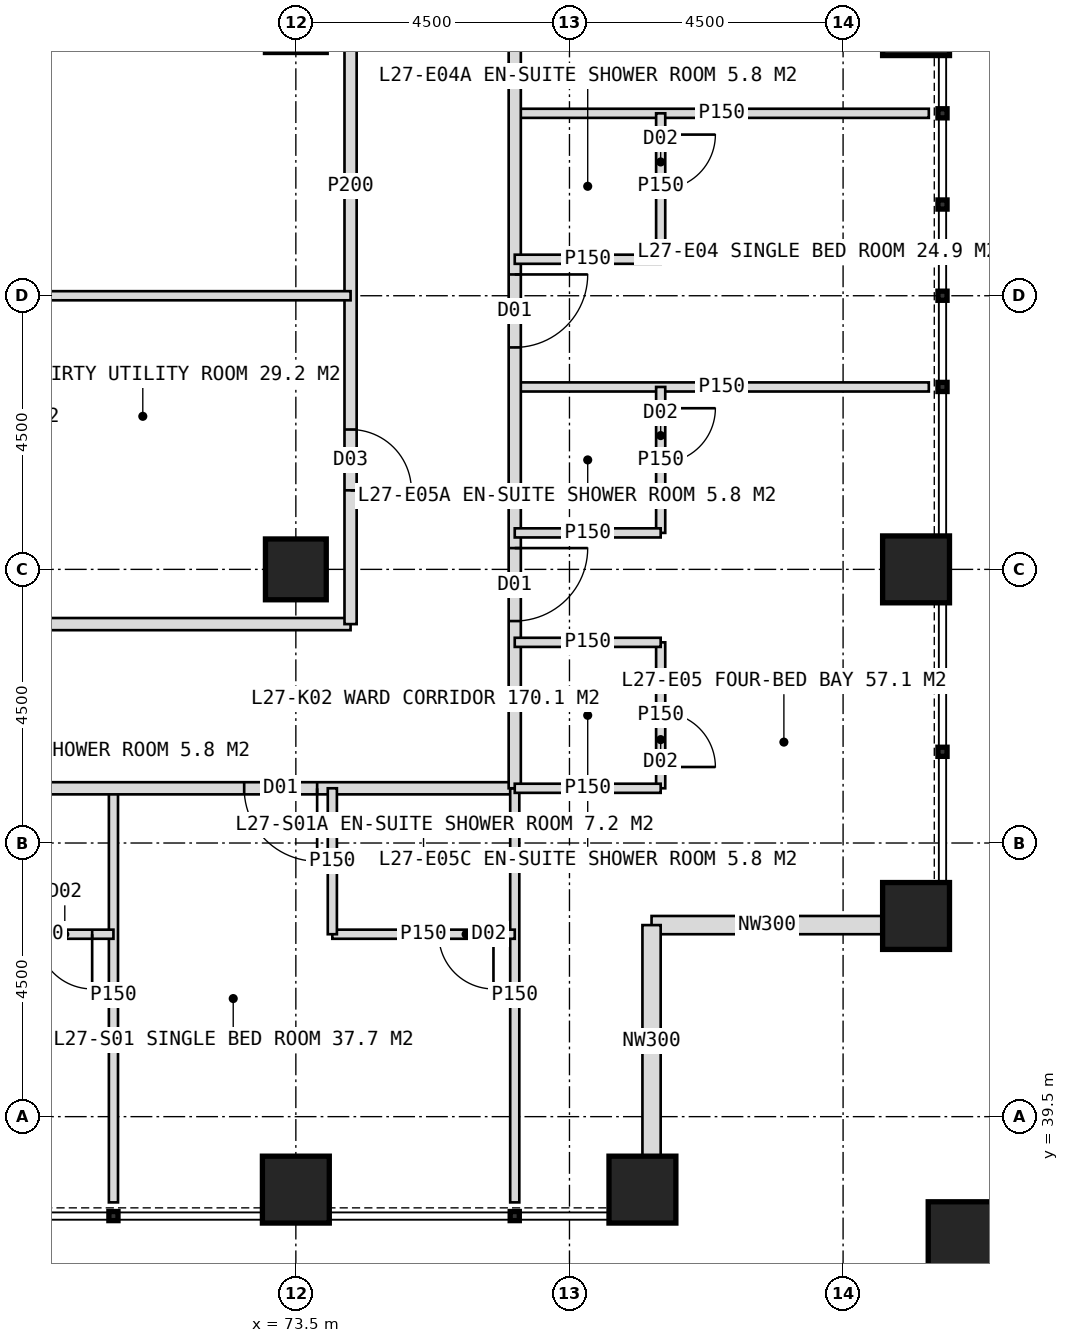
"""IFC4 building model, lengths in metres.
Left out: names, types, materials, properties, quantities, classifications, styles, units other than length and angle.
Written with IfcOpenShell. Run it as: python <this file> out.ifc"""

import sys

from ifc_helpers import new_model, si_unit, direction, frame, frame_2d, origin, origin_2d, place, context, subcontext, project, spatial, rectangle, hollow_rectangle, extrude, element, fill, save


model = new_model("IFC4")
c1 = context("Model", 3, precision=1e-05, world=origin(), true_north=direction((0.0, 1.0)))
c2 = subcontext(c1, "Body", "Model", "MODEL_VIEW")
j1 = project(units=[si_unit("LENGTHUNIT", "METRE"), si_unit("PLANEANGLEUNIT", "RADIAN")], contexts=[c1])
p1 = place(None, origin())
s1 = spatial("IfcSite", under=j1, at=p1, CompositionType="ELEMENT")
p2 = place(p1, origin())
s2 = spatial("IfcBuilding", under=s1, at=p2, CompositionType="ELEMENT")
p3 = place(p2, frame((0.0, 0.0, 116.0)))
s3 = spatial("IfcBuildingStorey", under=s2, at=p3, CompositionType="ELEMENT", Elevation=116.0)
p4 = place(p3, frame((73.5, 48.5, 0.0), z_axis=(0.0, 0.0, 1.0), x_axis=(1.0, 0.0, 0.0)))
e1 = element("IfcColumn", 1, at=p4, inside=s3, PredefinedType="COLUMN", context=c2, shape_type="SweptSolid", body=[
    extrude(hollow_rectangle(XDim=1.0, YDim=1.0, WallThickness=0.1, at=origin_2d()), origin(), (0.0, 0.0, 1.0), 4.0),
])
for number, where, z_axis, x_axis in (
    (2, (83.7, 42.8, 0.0), (0.0, 0.0, 1.0), (1.0, 0.0, 0.0)),
    (3, (83.7, 48.5, 0.0), (0.0, 0.0, 1.0), (1.0, 0.0, 0.0)),
    (4, (83.7, 57.5, 0.0), (0.0, 0.0, 1.0), (1.0, 0.0, 0.0)),
    (5, (73.5, 38.3, 0.0), (0.0, 0.0, 1.0), (1.0, 0.0, 0.0)),
    (6, (79.2, 38.3, 0.0), (0.0, 0.0, 1.0), (1.0, 0.0, 0.0)),
):
    element("IfcColumn", number, at=place(p3, frame(where, z_axis=z_axis, x_axis=x_axis)), inside=s3, PredefinedType="COLUMN", context=c2, shape_type="SweptSolid", body=[
        extrude(hollow_rectangle(XDim=1.1, YDim=1.1, WallThickness=0.1, at=origin_2d()), origin(), (0.0, 0.0, 1.0), 4.0),
    ])
p5 = place(p3, frame((84.6, 37.4, 0.0), z_axis=(0.0, 0.0, 1.0), x_axis=(1.0, 0.0, 0.0)))
e7 = element("IfcColumn", 7, at=p5, inside=s3, PredefinedType="COLUMN", context=c2, shape_type="SweptSolid", body=[
    extrude(hollow_rectangle(XDim=1.4, YDim=1.4, WallThickness=0.08, at=origin_2d()), origin(), (0.0, 0.0, 1.0), 4.0),
])
for number, where, z_axis, x_axis in (
    (8, (83.15, 42.65, 0.0), (0.0, 0.0, 1.0), (-1.0, 0.0, 0.0)),
    (9, (79.35, 42.65, 0.0), (0.0, 0.0, 1.0), (0.0, -1.0, 0.0)),
):
    element("IfcWall", number, at=place(p3, frame(where, z_axis=z_axis, x_axis=x_axis)), inside=s3, PredefinedType="ELEMENTEDWALL", context=c2, shape_type="SweptSolid", body=[
        extrude(rectangle(XDim=3.8, YDim=0.3, at=frame_2d((1.9, 0.0))), origin(), (0.0, 0.0, 1.0), 4.0),
    ])
p6 = place(p3, frame((70.5, 44.9, 0.0), z_axis=(0.0, 0.0, 1.0), x_axis=(0.0, -1.0, 0.0)))
e10 = element("IfcWall", 10, at=p6, inside=s3, PredefinedType="PARTITIONING", context=c2, shape_type="SweptSolid", body=[
    extrude(rectangle(XDim=6.81, YDim=0.15, at=frame_2d((3.405, 0.0))), origin(), (0.0, 0.0, 1.0), 3.75),
])
p7 = place(p3, frame((77.1, 44.9, 0.0), z_axis=(0.0, 0.0, 1.0), x_axis=(-1.0, 0.0, 0.0)))
e11 = element("IfcWall", 11, at=p7, inside=s3, PredefinedType="PARTITIONING", context=c2, shape_type="SweptSolid", body=[
    extrude(rectangle(XDim=34.2, YDim=0.2, at=frame_2d((17.1, 0.0))), origin(), (0.0, 0.0, 1.0), 3.75),
])
p8 = place(p7, frame((3.25, 0.0, 0.0)))
e12 = element("IfcOpeningElement", 12, at=p8, cuts=e11, PredefinedType="OPENING", context=c2, shape_type="SweptSolid", body=[
    extrude(rectangle(XDim=1.2, YDim=2.2, at=frame_2d((0.6, 1.1))), frame((0.0, 0.11, 0.0), z_axis=(0.0, -1.0, 0.0), x_axis=(1.0, 0.0, 0.0)), (0.0, 0.0, 1.0), 0.22),
])
p9 = place(p7, frame((9.25, 0.0, 0.0)))
e13 = element("IfcOpeningElement", 13, at=p9, cuts=e11, PredefinedType="OPENING", context=c2, shape_type="SweptSolid", body=[
    extrude(rectangle(XDim=1.2, YDim=2.2, at=frame_2d((0.6, 1.1))), frame((0.0, 0.11, 0.0), z_axis=(0.0, -1.0, 0.0), x_axis=(1.0, 0.0, 0.0)), (0.0, 0.0, 1.0), 0.22),
])
p10 = place(p7, frame((18.25, 0.0, 0.0)))
e14 = element("IfcOpeningElement", 14, at=p10, cuts=e11, PredefinedType="OPENING", context=c2, shape_type="SweptSolid", body=[
    extrude(rectangle(XDim=1.2, YDim=2.2, at=frame_2d((0.6, 1.1))), frame((0.0, 0.11, 0.0), z_axis=(0.0, -1.0, 0.0), x_axis=(1.0, 0.0, 0.0)), (0.0, 0.0, 1.0), 0.22),
])
p11 = place(p7, frame((27.25, 0.0, 0.0)))
e15 = element("IfcOpeningElement", 15, at=p11, cuts=e11, PredefinedType="OPENING", context=c2, shape_type="SweptSolid", body=[
    extrude(rectangle(XDim=1.2, YDim=2.2, at=frame_2d((0.6, 1.1))), frame((0.0, 0.11, 0.0), z_axis=(0.0, -1.0, 0.0), x_axis=(1.0, 0.0, 0.0)), (0.0, 0.0, 1.0), 0.22),
])
p12 = place(p3, frame((77.1, 44.9, 0.0), z_axis=(0.0, 0.0, 1.0), x_axis=(0.0, -1.0, 0.0)))
e16 = element("IfcWall", 16, at=p12, inside=s3, PredefinedType="PARTITIONING", context=c2, shape_type="SweptSolid", body=[
    extrude(rectangle(XDim=6.81, YDim=0.15, at=frame_2d((3.405, 0.0))), origin(), (0.0, 0.0, 1.0), 3.75),
])
p13 = place(p3, frame((77.1, 42.5, 0.0), z_axis=(0.0, 0.0, 1.0), x_axis=(-1.0, 0.0, 0.0)))
e17 = element("IfcWall", 17, at=p13, inside=s3, PredefinedType="PARTITIONING", context=c2, shape_type="SweptSolid", body=[
    extrude(rectangle(XDim=3.0, YDim=0.15, at=frame_2d((1.5, 0.0))), origin(), (0.0, 0.0, 1.0), 3.75),
])
p14 = place(p13, frame((0.35, 0.0, 0.0)))
e18 = element("IfcOpeningElement", 18, at=p14, cuts=e17, PredefinedType="OPENING", context=c2, shape_type="SweptSolid", body=[
    extrude(rectangle(XDim=0.9, YDim=2.1, at=frame_2d((0.45, 1.05))), frame((0.0, 0.085, 0.0), z_axis=(0.0, -1.0, 0.0), x_axis=(1.0, 0.0, 0.0)), (0.0, 0.0, 1.0), 0.17),
])
p15 = place(p3, frame((74.1, 44.9, 0.0), z_axis=(0.0, 0.0, 1.0), x_axis=(0.0, -1.0, 0.0)))
e19 = element("IfcWall", 19, at=p15, inside=s3, PredefinedType="PARTITIONING", context=c2, shape_type="SweptSolid", body=[
    extrude(rectangle(XDim=2.4, YDim=0.15, at=frame_2d((1.2, 0.0))), origin(), (0.0, 0.0, 1.0), 3.75),
])
p16 = place(p3, frame((70.5, 42.5, 0.0), z_axis=(0.0, 0.0, 1.0), x_axis=(-1.0, 0.0, 0.0)))
e20 = element("IfcWall", 20, at=p16, inside=s3, PredefinedType="PARTITIONING", context=c2, shape_type="SweptSolid", body=[
    extrude(rectangle(XDim=2.4, YDim=0.15, at=frame_2d((1.2, 0.0))), origin(), (0.0, 0.0, 1.0), 3.75),
])
p17 = place(p16, frame((0.35, 0.0, 0.0)))
e21 = element("IfcOpeningElement", 21, at=p17, cuts=e20, PredefinedType="OPENING", context=c2, shape_type="SweptSolid", body=[
    extrude(rectangle(XDim=0.9, YDim=2.1, at=frame_2d((0.45, 1.05))), frame((0.0, 0.085, 0.0), z_axis=(0.0, -1.0, 0.0), x_axis=(1.0, 0.0, 0.0)), (0.0, 0.0, 1.0), 0.17),
])
p18 = place(p3, frame((74.4, 47.6, 0.0), z_axis=(0.0, 0.0, 1.0), x_axis=(-1.0, 0.0, 0.0)))
e22 = element("IfcWall", 22, at=p18, inside=s3, PredefinedType="PARTITIONING", context=c2, shape_type="SweptSolid", body=[
    extrude(rectangle(XDim=12.15, YDim=0.2, at=frame_2d((6.075, 0.0))), origin(), (0.0, 0.0, 1.0), 3.75),
])
p19 = place(p18, frame((6.85, 0.0, 0.0)))
e23 = element("IfcOpeningElement", 23, at=p19, cuts=e22, PredefinedType="OPENING", context=c2, shape_type="SweptSolid", body=[
    extrude(rectangle(XDim=1.0, YDim=2.1, at=frame_2d((0.5, 1.05))), frame((0.0, 0.11, 0.0), z_axis=(0.0, -1.0, 0.0), x_axis=(1.0, 0.0, 0.0)), (0.0, 0.0, 1.0), 0.22),
])
for number, where, z_axis, x_axis in (
    (24, (77.1, 56.0, 0.0), (0.0, 0.0, 1.0), (1.0, 0.0, 0.0)),
    (25, (77.1, 51.5, 0.0), (0.0, 0.0, 1.0), (1.0, 0.0, 0.0)),
):
    element("IfcWall", number, at=place(p3, frame(where, z_axis=z_axis, x_axis=x_axis)), inside=s3, PredefinedType="PARTITIONING", context=c2, shape_type="SweptSolid", body=[
        extrude(rectangle(XDim=6.81, YDim=0.15, at=frame_2d((3.405, 0.0))), origin(), (0.0, 0.0, 1.0), 3.75),
    ])
p20 = place(p3, frame((77.1, 79.1, 0.0), z_axis=(0.0, 0.0, 1.0), x_axis=(0.0, -1.0, 0.0)))
e26 = element("IfcWall", 26, at=p20, inside=s3, PredefinedType="PARTITIONING", context=c2, shape_type="SweptSolid", body=[
    extrude(rectangle(XDim=34.2, YDim=0.2, at=frame_2d((17.1, 0.0))), origin(), (0.0, 0.0, 1.0), 3.75),
])
p21 = place(p20, frame((2.65, 0.0, 0.0)))
e27 = element("IfcOpeningElement", 27, at=p21, cuts=e26, PredefinedType="OPENING", context=c2, shape_type="SweptSolid", body=[
    extrude(rectangle(XDim=1.2, YDim=2.2, at=frame_2d((0.6, 1.1))), frame((0.0, 0.11, 0.0), z_axis=(0.0, -1.0, 0.0), x_axis=(1.0, 0.0, 0.0)), (0.0, 0.0, 1.0), 0.22),
])
p22 = place(p20, frame((10.75, 0.0, 0.0)))
e28 = element("IfcOpeningElement", 28, at=p22, cuts=e26, PredefinedType="OPENING", context=c2, shape_type="SweptSolid", body=[
    extrude(rectangle(XDim=1.2, YDim=2.2, at=frame_2d((0.6, 1.1))), frame((0.0, 0.11, 0.0), z_axis=(0.0, -1.0, 0.0), x_axis=(1.0, 0.0, 0.0)), (0.0, 0.0, 1.0), 0.22),
])
p23 = place(p20, frame((19.75, 0.0, 0.0)))
e29 = element("IfcOpeningElement", 29, at=p23, cuts=e26, PredefinedType="OPENING", context=c2, shape_type="SweptSolid", body=[
    extrude(rectangle(XDim=1.2, YDim=2.2, at=frame_2d((0.6, 1.1))), frame((0.0, 0.11, 0.0), z_axis=(0.0, -1.0, 0.0), x_axis=(1.0, 0.0, 0.0)), (0.0, 0.0, 1.0), 0.22),
])
p24 = place(p20, frame((25.75, 0.0, 0.0)))
e30 = element("IfcOpeningElement", 30, at=p24, cuts=e26, PredefinedType="OPENING", context=c2, shape_type="SweptSolid", body=[
    extrude(rectangle(XDim=1.2, YDim=2.2, at=frame_2d((0.6, 1.1))), frame((0.0, 0.11, 0.0), z_axis=(0.0, -1.0, 0.0), x_axis=(1.0, 0.0, 0.0)), (0.0, 0.0, 1.0), 0.22),
])
p25 = place(p20, frame((30.25, 0.0, 0.0)))
e31 = element("IfcOpeningElement", 31, at=p25, cuts=e26, PredefinedType="OPENING", context=c2, shape_type="SweptSolid", body=[
    extrude(rectangle(XDim=1.2, YDim=2.2, at=frame_2d((0.6, 1.1))), frame((0.0, 0.11, 0.0), z_axis=(0.0, -1.0, 0.0), x_axis=(1.0, 0.0, 0.0)), (0.0, 0.0, 1.0), 0.22),
])
p26 = place(p3, frame((79.5, 56.0, 0.0), z_axis=(0.0, 0.0, 1.0), x_axis=(0.0, -1.0, 0.0)))
e32 = element("IfcWall", 32, at=p26, inside=s3, PredefinedType="PARTITIONING", context=c2, shape_type="SweptSolid", body=[
    extrude(rectangle(XDim=2.4, YDim=0.15, at=frame_2d((1.2, 0.0))), origin(), (0.0, 0.0, 1.0), 3.75),
])
p27 = place(p26, frame((0.35, 0.0, 0.0)))
e33 = element("IfcOpeningElement", 33, at=p27, cuts=e32, PredefinedType="OPENING", context=c2, shape_type="SweptSolid", body=[
    extrude(rectangle(XDim=0.9, YDim=2.1, at=frame_2d((0.45, 1.05))), frame((0.0, 0.085, 0.0), z_axis=(0.0, -1.0, 0.0), x_axis=(1.0, 0.0, 0.0)), (0.0, 0.0, 1.0), 0.17),
])
p28 = place(p3, frame((77.1, 53.6, 0.0), z_axis=(0.0, 0.0, 1.0), x_axis=(1.0, 0.0, 0.0)))
e34 = element("IfcWall", 34, at=p28, inside=s3, PredefinedType="PARTITIONING", context=c2, shape_type="SweptSolid", body=[
    extrude(rectangle(XDim=2.4, YDim=0.15, at=frame_2d((1.2, 0.0))), origin(), (0.0, 0.0, 1.0), 3.75),
])
p29 = place(p3, frame((79.5, 51.5, 0.0), z_axis=(0.0, 0.0, 1.0), x_axis=(0.0, -1.0, 0.0)))
e35 = element("IfcWall", 35, at=p29, inside=s3, PredefinedType="PARTITIONING", context=c2, shape_type="SweptSolid", body=[
    extrude(rectangle(XDim=2.4, YDim=0.15, at=frame_2d((1.2, 0.0))), origin(), (0.0, 0.0, 1.0), 3.75),
])
p30 = place(p29, frame((0.35, 0.0, 0.0)))
e36 = element("IfcOpeningElement", 36, at=p30, cuts=e35, PredefinedType="OPENING", context=c2, shape_type="SweptSolid", body=[
    extrude(rectangle(XDim=0.9, YDim=2.1, at=frame_2d((0.45, 1.05))), frame((0.0, 0.085, 0.0), z_axis=(0.0, -1.0, 0.0), x_axis=(1.0, 0.0, 0.0)), (0.0, 0.0, 1.0), 0.17),
])
p31 = place(p3, frame((77.1, 49.1, 0.0), z_axis=(0.0, 0.0, 1.0), x_axis=(1.0, 0.0, 0.0)))
e37 = element("IfcWall", 37, at=p31, inside=s3, PredefinedType="PARTITIONING", context=c2, shape_type="SweptSolid", body=[
    extrude(rectangle(XDim=2.4, YDim=0.15, at=frame_2d((1.2, 0.0))), origin(), (0.0, 0.0, 1.0), 3.75),
])
p32 = place(p3, frame((79.5, 47.3, 0.0), z_axis=(0.0, 0.0, 1.0), x_axis=(0.0, -1.0, 0.0)))
e38 = element("IfcWall", 38, at=p32, inside=s3, PredefinedType="PARTITIONING", context=c2, shape_type="SweptSolid", body=[
    extrude(rectangle(XDim=2.4, YDim=0.15, at=frame_2d((1.2, 0.0))), origin(), (0.0, 0.0, 1.0), 3.75),
])
p33 = place(p32, frame((1.15, 0.0, 0.0)))
e39 = element("IfcOpeningElement", 39, at=p33, cuts=e38, PredefinedType="OPENING", context=c2, shape_type="SweptSolid", body=[
    extrude(rectangle(XDim=0.9, YDim=2.1, at=frame_2d((0.45, 1.05))), frame((0.0, 0.085, 0.0), z_axis=(0.0, -1.0, 0.0), x_axis=(1.0, 0.0, 0.0)), (0.0, 0.0, 1.0), 0.17),
])
for number, where, z_axis, x_axis in (
    (40, (77.1, 47.3, 0.0), (0.0, 0.0, 1.0), (1.0, 0.0, 0.0)),
    (41, (77.1, 44.9, 0.0), (0.0, 0.0, 1.0), (1.0, 0.0, 0.0)),
):
    element("IfcWall", number, at=place(p3, frame(where, z_axis=z_axis, x_axis=x_axis)), inside=s3, PredefinedType="PARTITIONING", context=c2, shape_type="SweptSolid", body=[
        extrude(rectangle(XDim=2.4, YDim=0.15, at=frame_2d((1.2, 0.0))), origin(), (0.0, 0.0, 1.0), 3.75),
    ])
p34 = place(p3, frame((74.4, 62.0, 0.0), z_axis=(0.0, 0.0, 1.0), x_axis=(0.0, -1.0, 0.0)))
e42 = element("IfcWall", 42, at=p34, inside=s3, PredefinedType="PARTITIONING", context=c2, shape_type="SweptSolid", body=[
    extrude(rectangle(XDim=14.4, YDim=0.2, at=frame_2d((7.2, 0.0))), origin(), (0.0, 0.0, 1.0), 3.75),
])
p35 = place(p34, frame((1.45, 0.0, 0.0)))
e43 = element("IfcOpeningElement", 43, at=p35, cuts=e42, PredefinedType="OPENING", context=c2, shape_type="SweptSolid", body=[
    extrude(rectangle(XDim=1.0, YDim=2.1, at=frame_2d((0.5, 1.05))), frame((0.0, 0.11, 0.0), z_axis=(0.0, -1.0, 0.0), x_axis=(1.0, 0.0, 0.0)), (0.0, 0.0, 1.0), 0.22),
])
p36 = place(p34, frame((11.2, 0.0, 0.0)))
e44 = element("IfcOpeningElement", 44, at=p36, cuts=e42, PredefinedType="OPENING", context=c2, shape_type="SweptSolid", body=[
    extrude(rectangle(XDim=1.0, YDim=2.1, at=frame_2d((0.5, 1.05))), frame((0.0, 0.11, 0.0), z_axis=(0.0, -1.0, 0.0), x_axis=(1.0, 0.0, 0.0)), (0.0, 0.0, 1.0), 0.22),
])
p37 = place(p3, frame((69.0, 53.0, 0.0), z_axis=(0.0, 0.0, 1.0), x_axis=(1.0, 0.0, 0.0)))
e45 = element("IfcWall", 45, at=p37, inside=s3, PredefinedType="PARTITIONING", context=c2, shape_type="SweptSolid", body=[
    extrude(rectangle(XDim=5.4, YDim=0.15, at=frame_2d((2.7, 0.0))), origin(), (0.0, 0.0, 1.0), 3.75),
])
p38 = place(p8, origin())
e46 = element("IfcDoor", 46, at=p38, inside=s3, OperationType="SINGLE_SWING_LEFT", PredefinedType="DOOR", context=c2, shape_type="SweptSolid", body=[
    extrude(rectangle(XDim=1.2, YDim=2.2, at=frame_2d((0.6, 1.1))), frame((0.0, 0.025, 0.0), z_axis=(0.0, -1.0, 0.0), x_axis=(1.0, 0.0, 0.0)), (0.0, 0.0, 1.0), 0.05),
])
fill(e12, e46)
p39 = place(p14, origin())
e47 = element("IfcDoor", 47, at=p39, inside=s3, OperationType="SINGLE_SWING_LEFT", PredefinedType="DOOR", context=c2, shape_type="SweptSolid", body=[
    extrude(rectangle(XDim=0.9, YDim=2.1, at=frame_2d((0.45, 1.05))), frame((0.0, 0.025, 0.0), z_axis=(0.0, -1.0, 0.0), x_axis=(1.0, 0.0, 0.0)), (0.0, 0.0, 1.0), 0.05),
])
fill(e18, e47)
p40 = place(p17, origin())
e48 = element("IfcDoor", 48, at=p40, inside=s3, OperationType="SINGLE_SWING_LEFT", PredefinedType="DOOR", context=c2, shape_type="SweptSolid", body=[
    extrude(rectangle(XDim=0.9, YDim=2.1, at=frame_2d((0.45, 1.05))), frame((0.0, 0.025, 0.0), z_axis=(0.0, -1.0, 0.0), x_axis=(1.0, 0.0, 0.0)), (0.0, 0.0, 1.0), 0.05),
])
fill(e21, e48)
p41 = place(p24, origin())
e49 = element("IfcDoor", 49, at=p41, inside=s3, OperationType="SINGLE_SWING_LEFT", PredefinedType="DOOR", context=c2, shape_type="SweptSolid", body=[
    extrude(rectangle(XDim=1.2, YDim=2.2, at=frame_2d((0.6, 1.1))), frame((0.0, 0.025, 0.0), z_axis=(0.0, -1.0, 0.0), x_axis=(1.0, 0.0, 0.0)), (0.0, 0.0, 1.0), 0.05),
])
fill(e30, e49)
p42 = place(p27, origin())
e50 = element("IfcDoor", 50, at=p42, inside=s3, OperationType="SINGLE_SWING_LEFT", PredefinedType="DOOR", context=c2, shape_type="SweptSolid", body=[
    extrude(rectangle(XDim=0.9, YDim=2.1, at=frame_2d((0.45, 1.05))), frame((0.0, 0.025, 0.0), z_axis=(0.0, -1.0, 0.0), x_axis=(1.0, 0.0, 0.0)), (0.0, 0.0, 1.0), 0.05),
])
fill(e33, e50)
p43 = place(p25, origin())
e51 = element("IfcDoor", 51, at=p43, inside=s3, OperationType="SINGLE_SWING_LEFT", PredefinedType="DOOR", context=c2, shape_type="SweptSolid", body=[
    extrude(rectangle(XDim=1.2, YDim=2.2, at=frame_2d((0.6, 1.1))), frame((0.0, 0.025, 0.0), z_axis=(0.0, -1.0, 0.0), x_axis=(1.0, 0.0, 0.0)), (0.0, 0.0, 1.0), 0.05),
])
fill(e31, e51)
p44 = place(p30, origin())
e52 = element("IfcDoor", 52, at=p44, inside=s3, OperationType="SINGLE_SWING_LEFT", PredefinedType="DOOR", context=c2, shape_type="SweptSolid", body=[
    extrude(rectangle(XDim=0.9, YDim=2.1, at=frame_2d((0.45, 1.05))), frame((0.0, 0.025, 0.0), z_axis=(0.0, -1.0, 0.0), x_axis=(1.0, 0.0, 0.0)), (0.0, 0.0, 1.0), 0.05),
])
fill(e36, e52)
p45 = place(p33, origin())
e53 = element("IfcDoor", 53, at=p45, inside=s3, OperationType="SINGLE_SWING_RIGHT", PredefinedType="DOOR", context=c2, shape_type="SweptSolid", body=[
    extrude(rectangle(XDim=0.9, YDim=2.1, at=frame_2d((0.45, 1.05))), frame((0.0, 0.025, 0.0), z_axis=(0.0, -1.0, 0.0), x_axis=(1.0, 0.0, 0.0)), (0.0, 0.0, 1.0), 0.05),
])
fill(e39, e53)
p46 = place(p36, origin())
e54 = element("IfcDoor", 54, at=p46, inside=s3, OperationType="SINGLE_SWING_RIGHT", PredefinedType="DOOR", context=c2, shape_type="SweptSolid", body=[
    extrude(rectangle(XDim=1.0, YDim=2.1, at=frame_2d((0.5, 1.05))), frame((0.0, 0.025, 0.0), z_axis=(0.0, -1.0, 0.0), x_axis=(1.0, 0.0, 0.0)), (0.0, 0.0, 1.0), 0.05),
])
fill(e44, e54)
save(model, sys.argv[1])
